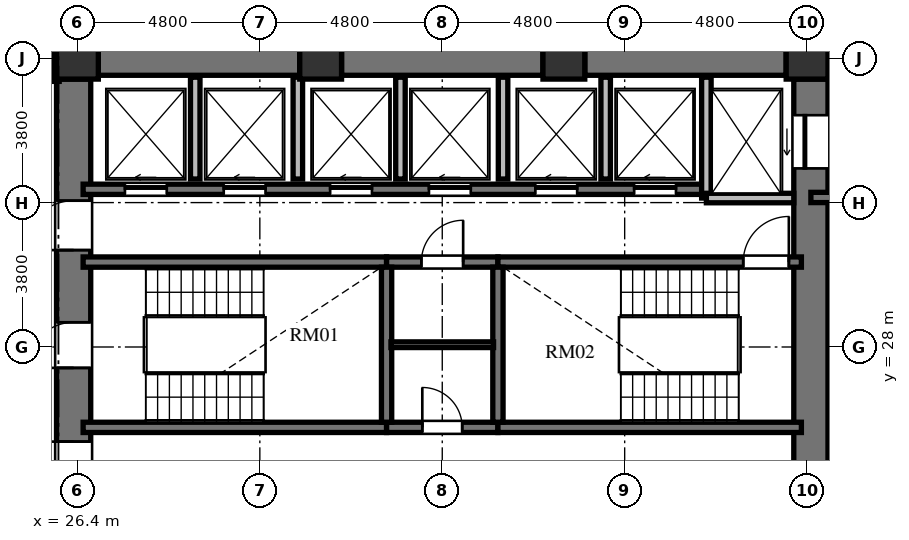
"""IFC4 building model, lengths in metres.
Left out: names, types, materials, properties, quantities, classifications, styles, units other than length and angle.
Written with IfcOpenShell. Run it as: python <this file> out.ifc"""

import sys

from ifc_helpers import new_model, si_unit, direction, frame, frame_2d, origin, origin_2d, place, context, subcontext, project, spatial, rectangle, extrude, element, fill, save


model = new_model("IFC4")
c1 = context("Model", 3, precision=1e-05, world=origin(), true_north=direction((0.0, 1.0)))
c2 = subcontext(c1, "Body", "Model", "MODEL_VIEW")
j1 = project(units=[si_unit("LENGTHUNIT", "METRE"), si_unit("PLANEANGLEUNIT", "RADIAN")], contexts=[c1])
p1 = place(None, origin())
s1 = spatial("IfcSite", under=j1, at=p1, CompositionType="ELEMENT")
p2 = place(p1, origin())
s2 = spatial("IfcBuilding", under=s1, at=p2, CompositionType="ELEMENT")
p3 = place(p2, frame((0.0, 0.0, 32.496)))
s3 = spatial("IfcBuildingStorey", under=s2, at=p3, CompositionType="ELEMENT", Elevation=32.496)
for number, where, z_axis, x_axis in (
    (1, (45.6, 35.6, 0.0), (0.0, 0.0, 1.0), (1.0, 0.0, 0.0)),
    (2, (39.2, 35.6, 0.0), (0.0, 0.0, 1.0), (1.0, 0.0, 0.0)),
    (3, (32.8, 35.6, 0.0), (0.0, 0.0, 1.0), (1.0, 0.0, 0.0)),
    (4, (26.4, 35.6, 0.0), (0.0, 0.0, 1.0), (1.0, 0.0, 0.0)),
):
    element("IfcColumn", number, at=place(p3, frame(where, z_axis=z_axis, x_axis=x_axis)), inside=s3, PredefinedType="COLUMN", context=c2, shape_type="SweptSolid", body=[
        extrude(rectangle(XDim=1.1, YDim=1.1, at=origin_2d()), origin(), (0.0, 0.0, 1.0), 3.648),
    ])
p4 = place(p3, frame((26.3, 20.95, 0.0), z_axis=(0.0, 0.0, 1.0), x_axis=(0.0, 1.0, 0.0)))
e5 = element("IfcWall", 5, at=p4, inside=s3, PredefinedType="SHEAR", context=c2, shape_type="SweptSolid", body=[
    extrude(rectangle(XDim=14.1, YDim=0.9, at=frame_2d((7.05, 0.0))), origin(), (0.0, 0.0, 1.0), 3.648),
])
p5 = place(p4, frame((6.5, 0.0, 0.0)))
e6 = element("IfcOpeningElement", 6, at=p5, cuts=e5, PredefinedType="OPENING", context=c2, shape_type="SweptSolid", body=[
    extrude(rectangle(XDim=1.2, YDim=2.15, at=frame_2d((0.6, 1.075))), frame((0.0, 0.46, 0.0), z_axis=(0.0, -1.0, 0.0), x_axis=(1.0, 0.0, 0.0)), (0.0, 0.0, 1.0), 0.92),
])
p6 = place(p4, frame((9.6, 0.0, 0.0)))
e7 = element("IfcOpeningElement", 7, at=p6, cuts=e5, PredefinedType="OPENING", context=c2, shape_type="SweptSolid", body=[
    extrude(rectangle(XDim=1.3, YDim=2.2, at=frame_2d((0.65, 1.1))), frame((0.0, 0.46, 0.0), z_axis=(0.0, -1.0, 0.0), x_axis=(1.0, 0.0, 0.0)), (0.0, 0.0, 1.0), 0.92),
])
p7 = place(p4, frame((3.26, 0.0, 0.0)))
e8 = element("IfcOpeningElement", 8, at=p7, cuts=e5, PredefinedType="OPENING", context=c2, shape_type="SweptSolid", body=[
    extrude(rectangle(XDim=1.3, YDim=2.2, at=frame_2d((0.65, 1.1))), frame((0.0, 0.46, 0.0), z_axis=(0.0, -1.0, 0.0), x_axis=(1.0, 0.0, 0.0)), (0.0, 0.0, 1.0), 0.92),
])
p8 = place(p3, frame((45.7, 20.95, 0.0), z_axis=(0.0, 0.0, 1.0), x_axis=(0.0, 1.0, 0.0)))
e9 = element("IfcWall", 9, at=p8, inside=s3, PredefinedType="SHEAR", context=c2, shape_type="SweptSolid", body=[
    extrude(rectangle(XDim=14.1, YDim=0.9, at=frame_2d((7.05, 0.0))), origin(), (0.0, 0.0, 1.0), 3.648),
])
p9 = place(p8, frame((11.75, 0.0, 0.0)))
e10 = element("IfcOpeningElement", 10, at=p9, cuts=e9, PredefinedType="OPENING", context=c2, shape_type="SweptSolid", body=[
    extrude(rectangle(XDim=1.4, YDim=2.3, at=frame_2d((0.7, 1.15))), frame((0.0, 0.46, 0.0), z_axis=(0.0, -1.0, 0.0), x_axis=(1.0, 0.0, 0.0)), (0.0, 0.0, 1.0), 0.92),
])
p10 = place(p8, frame((0.95, 0.0, 0.0)))
e11 = element("IfcOpeningElement", 11, at=p10, cuts=e9, PredefinedType="OPENING", context=c2, shape_type="SweptSolid", body=[
    extrude(rectangle(XDim=1.4, YDim=2.3, at=frame_2d((0.7, 1.15))), frame((0.0, 0.46, 0.0), z_axis=(0.0, -1.0, 0.0), x_axis=(1.0, 0.0, 0.0)), (0.0, 0.0, 1.0), 0.92),
])
p11 = place(p3, frame((26.95, 35.6, 0.0), z_axis=(0.0, 0.0, 1.0), x_axis=(1.0, 0.0, 0.0)))
e12 = element("IfcWall", 12, at=p11, inside=s3, PredefinedType="SHEAR", context=c2, shape_type="SweptSolid", body=[
    extrude(rectangle(XDim=5.3, YDim=0.9, at=frame_2d((2.65, 0.0))), origin(), (0.0, 0.0, 1.0), 3.648),
])
p12 = place(p3, frame((33.35, 35.6, 0.0), z_axis=(0.0, 0.0, 1.0), x_axis=(1.0, 0.0, 0.0)))
e13 = element("IfcWall", 13, at=p12, inside=s3, PredefinedType="SHEAR", context=c2, shape_type="SweptSolid", body=[
    extrude(rectangle(XDim=5.3, YDim=0.9, at=frame_2d((2.65, 0.0))), origin(), (0.0, 0.0, 1.0), 3.648),
])
p13 = place(p3, frame((39.75, 35.6, 0.0), z_axis=(0.0, 0.0, 1.0), x_axis=(1.0, 0.0, 0.0)))
e14 = element("IfcWall", 14, at=p13, inside=s3, PredefinedType="SHEAR", context=c2, shape_type="SweptSolid", body=[
    extrude(rectangle(XDim=5.3, YDim=0.9, at=frame_2d((2.65, 0.0))), origin(), (0.0, 0.0, 1.0), 3.648),
])
p14 = place(p3, frame((26.55, 30.235, 0.0), z_axis=(0.0, 0.0, 1.0), x_axis=(1.0, 0.0, 0.0)))
e15 = element("IfcWall", 15, at=p14, inside=s3, PredefinedType="SHEAR", context=c2, shape_type="SweptSolid", body=[
    extrude(rectangle(XDim=7.985, YDim=0.27, at=frame_2d((3.992, 0.0))), origin(), (0.0, 0.0, 1.0), 3.648),
])
p15 = place(p3, frame((34.535, 30.235, 0.0), z_axis=(0.0, 0.0, 1.0), x_axis=(1.0, 0.0, 0.0)))
e16 = element("IfcWall", 16, at=p15, inside=s3, PredefinedType="SHEAR", context=c2, shape_type="SweptSolid", body=[
    extrude(rectangle(XDim=2.93, YDim=0.27, at=frame_2d((1.465, 0.0))), origin(), (0.0, 0.0, 1.0), 3.648),
])
p16 = place(p15, frame((0.915, 0.0, 0.0)))
e17 = element("IfcOpeningElement", 17, at=p16, cuts=e16, PredefinedType="OPENING", context=c2, shape_type="SweptSolid", body=[
    extrude(rectangle(XDim=1.1, YDim=2.15, at=frame_2d((0.55, 1.075))), frame((0.0, 0.145, 0.0), z_axis=(0.0, -1.0, 0.0), x_axis=(1.0, 0.0, 0.0)), (0.0, 0.0, 1.0), 0.29),
])
p17 = place(p3, frame((37.465, 30.235, 0.0), z_axis=(0.0, 0.0, 1.0), x_axis=(1.0, 0.0, 0.0)))
e18 = element("IfcWall", 18, at=p17, inside=s3, PredefinedType="SHEAR", context=c2, shape_type="SweptSolid", body=[
    extrude(rectangle(XDim=7.985, YDim=0.27, at=frame_2d((3.992, 0.0))), origin(), (0.0, 0.0, 1.0), 3.648),
])
p18 = place(p17, frame((6.455, 0.0, 0.0)))
e19 = element("IfcOpeningElement", 19, at=p18, cuts=e18, PredefinedType="OPENING", context=c2, shape_type="SweptSolid", body=[
    extrude(rectangle(XDim=1.2, YDim=2.15, at=frame_2d((0.6, 1.075))), frame((0.0, 0.145, 0.0), z_axis=(0.0, -1.0, 0.0), x_axis=(1.0, 0.0, 0.0)), (0.0, 0.0, 1.0), 0.29),
])
p19 = place(p3, frame((26.55, 25.885, 0.0), z_axis=(0.0, 0.0, 1.0), x_axis=(1.0, 0.0, 0.0)))
e20 = element("IfcWall", 20, at=p19, inside=s3, PredefinedType="SHEAR", context=c2, shape_type="SweptSolid", body=[
    extrude(rectangle(XDim=7.985, YDim=0.27, at=frame_2d((3.992, 0.0))), origin(), (0.0, 0.0, 1.0), 3.648),
])
p20 = place(p3, frame((34.535, 25.885, 0.0), z_axis=(0.0, 0.0, 1.0), x_axis=(1.0, 0.0, 0.0)))
e21 = element("IfcWall", 21, at=p20, inside=s3, PredefinedType="SHEAR", context=c2, shape_type="SweptSolid", body=[
    extrude(rectangle(XDim=2.93, YDim=0.27, at=frame_2d((1.465, 0.0))), origin(), (0.0, 0.0, 1.0), 3.648),
])
p21 = place(p20, frame((0.94, 0.0, 0.0)))
e22 = element("IfcOpeningElement", 22, at=p21, cuts=e21, PredefinedType="OPENING", context=c2, shape_type="SweptSolid", body=[
    extrude(rectangle(XDim=1.05, YDim=2.15, at=frame_2d((0.525, 1.075))), frame((0.0, 0.145, 0.0), z_axis=(0.0, -1.0, 0.0), x_axis=(1.0, 0.0, 0.0)), (0.0, 0.0, 1.0), 0.29),
])
p22 = place(p3, frame((37.465, 25.885, 0.0), z_axis=(0.0, 0.0, 1.0), x_axis=(1.0, 0.0, 0.0)))
e23 = element("IfcWall", 23, at=p22, inside=s3, PredefinedType="SHEAR", context=c2, shape_type="SweptSolid", body=[
    extrude(rectangle(XDim=7.985, YDim=0.27, at=frame_2d((3.992, 0.0))), origin(), (0.0, 0.0, 1.0), 3.648),
])
for number, where, z_axis, x_axis in (
    (24, (34.535, 26.02, 0.0), (0.0, 0.0, 1.0), (0.0, 1.0, 0.0)),
    (25, (37.465, 26.02, 0.0), (0.0, 0.0, 1.0), (0.0, 1.0, 0.0)),
):
    element("IfcWall", number, at=place(p3, frame(where, z_axis=z_axis, x_axis=x_axis)), inside=s3, PredefinedType="SHEAR", context=c2, shape_type="SweptSolid", body=[
        extrude(rectangle(XDim=4.08, YDim=0.27, at=frame_2d((2.04, 0.0))), origin(), (0.0, 0.0, 1.0), 3.648),
    ])
p23 = place(p3, frame((34.65, 28.06, 0.0), z_axis=(0.0, 0.0, 1.0), x_axis=(1.0, 0.0, 0.0)))
e26 = element("IfcWall", 26, at=p23, inside=s3, PredefinedType="PARTITIONING", context=c2, shape_type="SweptSolid", body=[
    extrude(rectangle(XDim=2.7, YDim=0.15, at=frame_2d((1.35, 0.0))), origin(), (0.0, 0.0, 1.0), 3.428),
])
p24 = place(p3, frame((26.55, 32.15, 0.0), z_axis=(0.0, 0.0, 1.0), x_axis=(1.0, 0.0, 0.0)))
e27 = element("IfcWall", 27, at=p24, inside=s3, PredefinedType="SHEAR", context=c2, shape_type="SweptSolid", body=[
    extrude(rectangle(XDim=16.4, YDim=0.27, at=frame_2d((8.2, 0.0))), origin(), (0.0, 0.0, 1.0), 3.648),
])
p25 = place(p24, frame((1.1, 0.0, 0.0)))
e28 = element("IfcOpeningElement", 28, at=p25, cuts=e27, PredefinedType="OPENING", context=c2, shape_type="SweptSolid", body=[
    extrude(rectangle(XDim=1.1, YDim=2.2, at=frame_2d((0.55, 1.1))), frame((0.0, 0.145, 0.0), z_axis=(0.0, -1.0, 0.0), x_axis=(1.0, 0.0, 0.0)), (0.0, 0.0, 1.0), 0.29),
])
p26 = place(p24, frame((3.7, 0.0, 0.0)))
e29 = element("IfcOpeningElement", 29, at=p26, cuts=e27, PredefinedType="OPENING", context=c2, shape_type="SweptSolid", body=[
    extrude(rectangle(XDim=1.1, YDim=2.2, at=frame_2d((0.55, 1.1))), frame((0.0, 0.145, 0.0), z_axis=(0.0, -1.0, 0.0), x_axis=(1.0, 0.0, 0.0)), (0.0, 0.0, 1.0), 0.29),
])
p27 = place(p24, frame((6.5, 0.0, 0.0)))
e30 = element("IfcOpeningElement", 30, at=p27, cuts=e27, PredefinedType="OPENING", context=c2, shape_type="SweptSolid", body=[
    extrude(rectangle(XDim=1.1, YDim=2.2, at=frame_2d((0.55, 1.1))), frame((0.0, 0.145, 0.0), z_axis=(0.0, -1.0, 0.0), x_axis=(1.0, 0.0, 0.0)), (0.0, 0.0, 1.0), 0.29),
])
p28 = place(p24, frame((9.1, 0.0, 0.0)))
e31 = element("IfcOpeningElement", 31, at=p28, cuts=e27, PredefinedType="OPENING", context=c2, shape_type="SweptSolid", body=[
    extrude(rectangle(XDim=1.1, YDim=2.2, at=frame_2d((0.55, 1.1))), frame((0.0, 0.145, 0.0), z_axis=(0.0, -1.0, 0.0), x_axis=(1.0, 0.0, 0.0)), (0.0, 0.0, 1.0), 0.29),
])
p29 = place(p24, frame((11.9, 0.0, 0.0)))
e32 = element("IfcOpeningElement", 32, at=p29, cuts=e27, PredefinedType="OPENING", context=c2, shape_type="SweptSolid", body=[
    extrude(rectangle(XDim=1.1, YDim=2.2, at=frame_2d((0.55, 1.1))), frame((0.0, 0.145, 0.0), z_axis=(0.0, -1.0, 0.0), x_axis=(1.0, 0.0, 0.0)), (0.0, 0.0, 1.0), 0.29),
])
p30 = place(p24, frame((14.5, 0.0, 0.0)))
e33 = element("IfcOpeningElement", 33, at=p30, cuts=e27, PredefinedType="OPENING", context=c2, shape_type="SweptSolid", body=[
    extrude(rectangle(XDim=1.1, YDim=2.2, at=frame_2d((0.55, 1.1))), frame((0.0, 0.145, 0.0), z_axis=(0.0, -1.0, 0.0), x_axis=(1.0, 0.0, 0.0)), (0.0, 0.0, 1.0), 0.29),
])
p31 = place(p3, frame((42.95, 31.92, 0.0), z_axis=(0.0, 0.0, 1.0), x_axis=(0.0, 1.0, 0.0)))
e34 = element("IfcWall", 34, at=p31, inside=s3, PredefinedType="SOLIDWALL", context=c2, shape_type="SweptSolid", body=[
    extrude(rectangle(XDim=3.18, YDim=0.25, at=frame_2d((1.59, 0.0))), origin(), (0.0, 0.0, 1.0), 3.428),
])
p32 = place(p3, frame((42.95, 31.92, 0.0), z_axis=(0.0, 0.0, 1.0), x_axis=(1.0, 0.0, 0.0)))
e35 = element("IfcWall", 35, at=p32, inside=s3, PredefinedType="SOLIDWALL", context=c2, shape_type="SweptSolid", body=[
    extrude(rectangle(XDim=2.3, YDim=0.25, at=frame_2d((1.15, 0.0))), origin(), (0.0, 0.0, 1.0), 3.428),
])
for number, where, z_axis, x_axis in (
    (36, (29.5, 32.42, 0.0), (0.0, 0.0, 1.0), (0.0, 1.0, 0.0)),
    (37, (32.2, 32.42, 0.0), (0.0, 0.0, 1.0), (0.0, 1.0, 0.0)),
    (38, (34.9, 32.42, 0.0), (0.0, 0.0, 1.0), (0.0, 1.0, 0.0)),
    (39, (37.6, 32.42, 0.0), (0.0, 0.0, 1.0), (0.0, 1.0, 0.0)),
    (40, (40.3, 32.42, 0.0), (0.0, 0.0, 1.0), (0.0, 1.0, 0.0)),
):
    element("IfcWall", number, at=place(p3, frame(where, z_axis=z_axis, x_axis=x_axis)), inside=s3, PredefinedType="SOLIDWALL", context=c2, shape_type="SweptSolid", body=[
        extrude(rectangle(XDim=2.68, YDim=0.25, at=frame_2d((1.34, 0.0))), origin(), (0.0, 0.0, 1.0), 3.428),
    ])
p33 = place(p3, frame((45.7, 31.935, 0.0), z_axis=(0.0, 0.0, 1.0), x_axis=(1.0, 0.0, 0.0)))
e41 = element("IfcWall", 41, at=p33, inside=s3, PredefinedType="SHEAR", context=c2, shape_type="SweptSolid", body=[
    extrude(rectangle(XDim=4.715, YDim=0.27, at=frame_2d((2.357, 0.0))), origin(), (0.0, 0.0, 1.0), 3.648),
])
p34 = place(p3, frame((25.83, 36.21, 0.0), z_axis=(0.0, 0.0, 1.0), x_axis=(0.0, -1.0, 0.0)))
e42 = element("IfcWall", 42, at=p34, inside=s3, PredefinedType="PARTITIONING", context=c2, shape_type="SweptSolid", body=[
    extrude(rectangle(XDim=1.22, YDim=0.18, at=frame_2d((0.61, 0.0))), origin(), (0.0, 0.0, 1.0), 3.428),
])
p35 = place(p5, origin())
e43 = element("IfcDoor", 43, at=p35, inside=s3, OperationType="SINGLE_SWING_LEFT", PredefinedType="DOOR", context=c2, shape_type="SweptSolid", body=[
    extrude(rectangle(XDim=1.2, YDim=2.15, at=frame_2d((0.6, 1.075))), frame((0.0, 0.025, 0.0), z_axis=(0.0, -1.0, 0.0), x_axis=(1.0, 0.0, 0.0)), (0.0, 0.0, 1.0), 0.05),
])
fill(e6, e43)
p36 = place(p18, origin())
e44 = element("IfcDoor", 44, at=p36, inside=s3, OperationType="SINGLE_SWING_RIGHT", PredefinedType="DOOR", context=c2, shape_type="SweptSolid", body=[
    extrude(rectangle(XDim=1.2, YDim=2.15, at=frame_2d((0.6, 1.075))), frame((0.0, 0.025, 0.0), z_axis=(0.0, -1.0, 0.0), x_axis=(1.0, 0.0, 0.0)), (0.0, 0.0, 1.0), 0.05),
])
fill(e19, e44)
p37 = place(p21, origin())
e45 = element("IfcDoor", 45, at=p37, inside=s3, OperationType="SINGLE_SWING_LEFT", PredefinedType="DOOR", context=c2, shape_type="SweptSolid", body=[
    extrude(rectangle(XDim=1.05, YDim=2.15, at=frame_2d((0.525, 1.075))), frame((0.0, 0.025, 0.0), z_axis=(0.0, -1.0, 0.0), x_axis=(1.0, 0.0, 0.0)), (0.0, 0.0, 1.0), 0.05),
])
fill(e22, e45)
p38 = place(p16, origin())
e46 = element("IfcDoor", 46, at=p38, inside=s3, OperationType="SINGLE_SWING_RIGHT", PredefinedType="DOOR", context=c2, shape_type="SweptSolid", body=[
    extrude(rectangle(XDim=1.1, YDim=2.15, at=frame_2d((0.55, 1.075))), frame((0.0, 0.025, 0.0), z_axis=(0.0, -1.0, 0.0), x_axis=(1.0, 0.0, 0.0)), (0.0, 0.0, 1.0), 0.05),
])
fill(e17, e46)
p39 = place(p6, origin())
e47 = element("IfcDoor", 47, at=p39, inside=s3, OperationType="SINGLE_SWING_LEFT", PredefinedType="DOOR", context=c2, shape_type="SweptSolid", body=[
    extrude(rectangle(XDim=1.3, YDim=2.2, at=frame_2d((0.65, 1.1))), frame((0.0, 0.025, 0.0), z_axis=(0.0, -1.0, 0.0), x_axis=(1.0, 0.0, 0.0)), (0.0, 0.0, 1.0), 0.05),
])
fill(e7, e47)
p40 = place(p7, origin())
e48 = element("IfcDoor", 48, at=p40, inside=s3, OperationType="SINGLE_SWING_RIGHT", PredefinedType="DOOR", context=c2, shape_type="SweptSolid", body=[
    extrude(rectangle(XDim=1.3, YDim=2.2, at=frame_2d((0.65, 1.1))), frame((0.0, 0.025, 0.0), z_axis=(0.0, -1.0, 0.0), x_axis=(1.0, 0.0, 0.0)), (0.0, 0.0, 1.0), 0.05),
])
fill(e8, e48)
p41 = place(p25, origin())
e49 = element("IfcDoor", 49, at=p41, inside=s3, OperationType="SLIDING_TO_LEFT", PredefinedType="DOOR", context=c2, shape_type="SweptSolid", body=[
    extrude(rectangle(XDim=1.1, YDim=2.2, at=frame_2d((0.55, 1.1))), frame((0.0, 0.025, 0.0), z_axis=(0.0, -1.0, 0.0), x_axis=(1.0, 0.0, 0.0)), (0.0, 0.0, 1.0), 0.05),
])
fill(e28, e49)
p42 = place(p26, origin())
e50 = element("IfcDoor", 50, at=p42, inside=s3, OperationType="SLIDING_TO_LEFT", PredefinedType="DOOR", context=c2, shape_type="SweptSolid", body=[
    extrude(rectangle(XDim=1.1, YDim=2.2, at=frame_2d((0.55, 1.1))), frame((0.0, 0.025, 0.0), z_axis=(0.0, -1.0, 0.0), x_axis=(1.0, 0.0, 0.0)), (0.0, 0.0, 1.0), 0.05),
])
fill(e29, e50)
p43 = place(p27, origin())
e51 = element("IfcDoor", 51, at=p43, inside=s3, OperationType="SLIDING_TO_LEFT", PredefinedType="DOOR", context=c2, shape_type="SweptSolid", body=[
    extrude(rectangle(XDim=1.1, YDim=2.2, at=frame_2d((0.55, 1.1))), frame((0.0, 0.025, 0.0), z_axis=(0.0, -1.0, 0.0), x_axis=(1.0, 0.0, 0.0)), (0.0, 0.0, 1.0), 0.05),
])
fill(e30, e51)
p44 = place(p28, origin())
e52 = element("IfcDoor", 52, at=p44, inside=s3, OperationType="SLIDING_TO_LEFT", PredefinedType="DOOR", context=c2, shape_type="SweptSolid", body=[
    extrude(rectangle(XDim=1.1, YDim=2.2, at=frame_2d((0.55, 1.1))), frame((0.0, 0.025, 0.0), z_axis=(0.0, -1.0, 0.0), x_axis=(1.0, 0.0, 0.0)), (0.0, 0.0, 1.0), 0.05),
])
fill(e31, e52)
p45 = place(p29, origin())
e53 = element("IfcDoor", 53, at=p45, inside=s3, OperationType="SLIDING_TO_LEFT", PredefinedType="DOOR", context=c2, shape_type="SweptSolid", body=[
    extrude(rectangle(XDim=1.1, YDim=2.2, at=frame_2d((0.55, 1.1))), frame((0.0, 0.025, 0.0), z_axis=(0.0, -1.0, 0.0), x_axis=(1.0, 0.0, 0.0)), (0.0, 0.0, 1.0), 0.05),
])
fill(e32, e53)
p46 = place(p30, origin())
e54 = element("IfcDoor", 54, at=p46, inside=s3, OperationType="SLIDING_TO_LEFT", PredefinedType="DOOR", context=c2, shape_type="SweptSolid", body=[
    extrude(rectangle(XDim=1.1, YDim=2.2, at=frame_2d((0.55, 1.1))), frame((0.0, 0.025, 0.0), z_axis=(0.0, -1.0, 0.0), x_axis=(1.0, 0.0, 0.0)), (0.0, 0.0, 1.0), 0.05),
])
fill(e33, e54)
p47 = place(p9, origin())
e55 = element("IfcDoor", 55, at=p47, inside=s3, OperationType="SLIDING_TO_LEFT", PredefinedType="DOOR", context=c2, shape_type="SweptSolid", body=[
    extrude(rectangle(XDim=1.4, YDim=2.3, at=frame_2d((0.7, 1.15))), frame((0.0, 0.025, 0.0), z_axis=(0.0, -1.0, 0.0), x_axis=(1.0, 0.0, 0.0)), (0.0, 0.0, 1.0), 0.05),
])
fill(e10, e55)
save(model, sys.argv[1])
